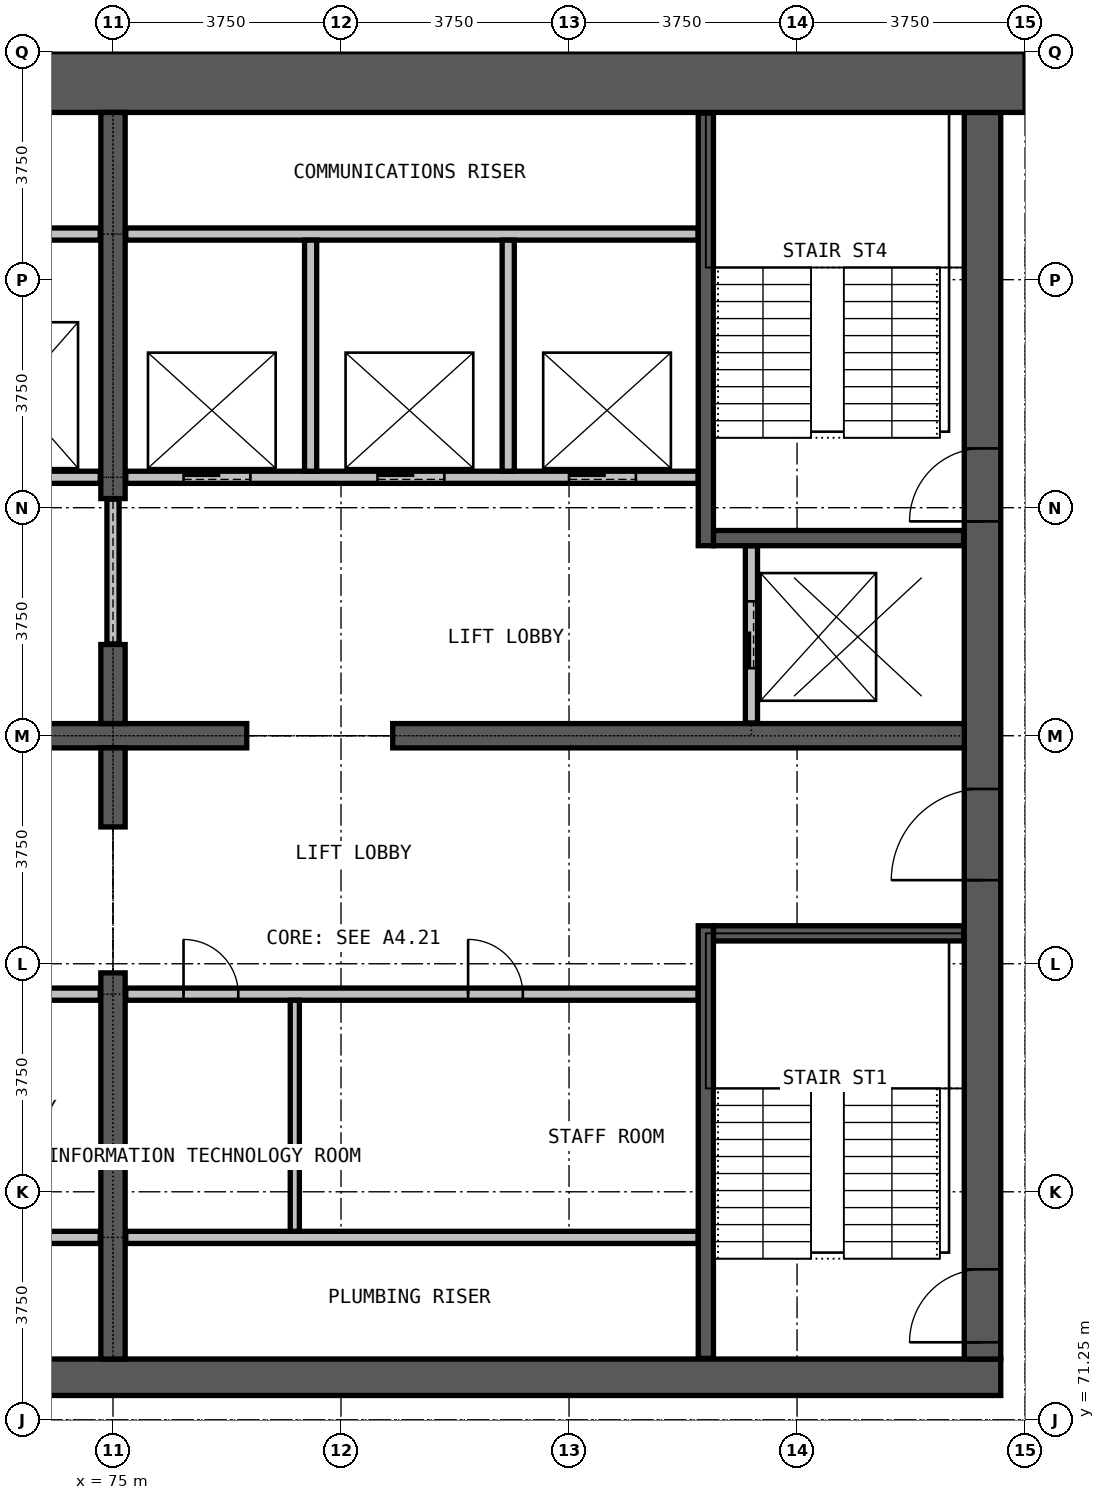
"""IFC4 building model, lengths in metres.
Left out: names, types, materials, properties, quantities, classifications, styles, units other than length and angle.
Written with IfcOpenShell. Run it as: python <this file> out.ifc"""

import sys

from ifc_helpers import new_model, si_unit, direction, frame, frame_2d, origin, place, context, subcontext, project, spatial, rectangle, extrude, element, fill, save


model = new_model("IFC4")
c1 = context("Model", 3, precision=1e-05, world=origin(), true_north=direction((0.0, 1.0)))
c2 = subcontext(c1, "Body", "Model", "MODEL_VIEW")
j1 = project(units=[si_unit("LENGTHUNIT", "METRE"), si_unit("PLANEANGLEUNIT", "RADIAN")], contexts=[c1])
p1 = place(None, origin())
s1 = spatial("IfcSite", under=j1, at=p1, CompositionType="ELEMENT")
p2 = place(p1, origin())
s2 = spatial("IfcBuilding", under=s1, at=p2, CompositionType="ELEMENT")
p3 = place(p2, frame((0.0, 0.0, 188.7)))
s3 = spatial("IfcBuildingStorey", under=s2, at=p3, CompositionType="ELEMENT", Elevation=188.7)
p4 = place(p3, frame((60.4, 71.95, 0.0), z_axis=(0.0, 0.0, 1.0), x_axis=(1.0, 0.0, 0.0)))
e1 = element("IfcWall", 1, at=p4, inside=s3, PredefinedType="SHEAR", context=c2, shape_type="SweptSolid", body=[
    extrude(rectangle(XDim=29.2, YDim=0.6, at=frame_2d((14.6, 0.0))), origin(), (0.0, 0.0, 1.0), 3.6),
])
p5 = place(p3, frame((89.3, 72.25, 0.0), z_axis=(0.0, 0.0, 1.0), x_axis=(0.0, 1.0, 0.0)))
e2 = element("IfcWall", 2, at=p5, inside=s3, PredefinedType="SHEAR", context=c2, shape_type="SweptSolid", body=[
    extrude(rectangle(XDim=20.5, YDim=0.6, at=frame_2d((10.25, 0.0))), origin(), (0.0, 0.0, 1.0), 3.6),
])
p6 = place(p5, frame((0.275, 0.0, 0.0)))
e3 = element("IfcOpeningElement", 3, at=p6, cuts=e2, PredefinedType="OPENING", context=c2, shape_type="SweptSolid", body=[
    extrude(rectangle(XDim=1.2, YDim=2.2, at=frame_2d((0.6, 1.1))), frame((0.0, 0.31, 0.0), z_axis=(0.0, -1.0, 0.0), x_axis=(1.0, 0.0, 0.0)), (0.0, 0.0, 1.0), 0.62),
])
p7 = place(p5, frame((13.775, 0.0, 0.0)))
e4 = element("IfcOpeningElement", 4, at=p7, cuts=e2, PredefinedType="OPENING", context=c2, shape_type="SweptSolid", body=[
    extrude(rectangle(XDim=1.2, YDim=2.2, at=frame_2d((0.6, 1.1))), frame((0.0, 0.31, 0.0), z_axis=(0.0, -1.0, 0.0), x_axis=(1.0, 0.0, 0.0)), (0.0, 0.0, 1.0), 0.62),
])
p8 = place(p5, frame((7.875, 0.0, 0.0)))
e5 = element("IfcOpeningElement", 5, at=p8, cuts=e2, PredefinedType="OPENING", context=c2, shape_type="SweptSolid", body=[
    extrude(rectangle(XDim=1.5, YDim=2.2, at=frame_2d((0.75, 1.1))), frame((0.0, 0.31, 0.0), z_axis=(0.0, -1.0, 0.0), x_axis=(1.0, 0.0, 0.0)), (0.0, 0.0, 1.0), 0.62),
])
p9 = place(p3, frame((90.0, 93.25, 0.0), z_axis=(0.0, 0.0, 1.0), x_axis=(-1.0, 0.0, 0.0)))
e6 = element("IfcWall", 6, at=p9, inside=s3, PredefinedType="SHEAR", context=c2, shape_type="SweptSolid", body=[
    extrude(rectangle(XDim=30.0, YDim=1.0, at=frame_2d((15.0, 0.0))), origin(), (0.0, 0.0, 1.0), 3.6),
])
p10 = place(p3, frame((72.8, 82.5, 0.0), z_axis=(0.0, 0.0, 1.0), x_axis=(1.0, 0.0, 0.0)))
e7 = element("IfcWall", 7, at=p10, inside=s3, PredefinedType="SHEAR", context=c2, shape_type="SweptSolid", body=[
    extrude(rectangle(XDim=4.4, YDim=0.4, at=frame_2d((2.2, 0.0))), origin(), (0.0, 0.0, 1.0), 3.6),
])
p11 = place(p3, frame((79.6, 82.5, 0.0), z_axis=(0.0, 0.0, 1.0), x_axis=(1.0, 0.0, 0.0)))
e8 = element("IfcWall", 8, at=p11, inside=s3, PredefinedType="SHEAR", context=c2, shape_type="SweptSolid", body=[
    extrude(rectangle(XDim=9.4, YDim=0.4, at=frame_2d((4.7, 0.0))), origin(), (0.0, 0.0, 1.0), 3.6),
])
p12 = place(p3, frame((75.0, 72.25, 0.0), z_axis=(0.0, 0.0, 1.0), x_axis=(0.0, 1.0, 0.0)))
e9 = element("IfcWall", 9, at=p12, inside=s3, PredefinedType="SHEAR", context=c2, shape_type="SweptSolid", body=[
    extrude(rectangle(XDim=6.35, YDim=0.4, at=frame_2d((3.175, 0.0))), origin(), (0.0, 0.0, 1.0), 3.6),
])
for number, where, z_axis, x_axis in (
    (10, (75.0, 81.0, 0.0), (0.0, 0.0, 1.0), (0.0, 1.0, 0.0)),
    (11, (75.0, 82.7, 0.0), (0.0, 0.0, 1.0), (0.0, 1.0, 0.0)),
):
    element("IfcWall", number, at=place(p3, frame(where, z_axis=z_axis, x_axis=x_axis)), inside=s3, PredefinedType="SHEAR", context=c2, shape_type="SweptSolid", body=[
        extrude(rectangle(XDim=1.3, YDim=0.4, at=frame_2d((0.65, 0.0))), origin(), (0.0, 0.0, 1.0), 3.6),
    ])
p13 = place(p3, frame((75.0, 86.4, 0.0), z_axis=(0.0, 0.0, 1.0), x_axis=(0.0, 1.0, 0.0)))
e12 = element("IfcWall", 12, at=p13, inside=s3, PredefinedType="SHEAR", context=c2, shape_type="SweptSolid", body=[
    extrude(rectangle(XDim=6.35, YDim=0.4, at=frame_2d((3.175, 0.0))), origin(), (0.0, 0.0, 1.0), 3.6),
])
for number, where, z_axis, x_axis in (
    (13, (65.375, 74.25, 0.0), (0.0, 0.0, 1.0), (1.0, 0.0, 0.0)),
    (14, (75.21, 74.25, 0.0), (0.0, 0.0, 1.0), (1.0, 0.0, 0.0)),
):
    element("IfcWall", number, at=place(p3, frame(where, z_axis=z_axis, x_axis=x_axis)), inside=s3, PredefinedType="PARTITIONING", context=c2, shape_type="SweptSolid", body=[
        extrude(rectangle(XDim=9.415, YDim=0.2, at=frame_2d((4.708, 0.0))), origin(), (0.0, 0.0, 1.0), 3.3),
    ])
p14 = place(p3, frame((65.375, 78.25, 0.0), z_axis=(0.0, 0.0, 1.0), x_axis=(1.0, 0.0, 0.0)))
e15 = element("IfcWall", 15, at=p14, inside=s3, PredefinedType="PARTITIONING", context=c2, shape_type="SweptSolid", body=[
    extrude(rectangle(XDim=9.415, YDim=0.2, at=frame_2d((4.708, 0.0))), origin(), (0.0, 0.0, 1.0), 3.3),
])
p15 = place(p14, frame((1.9, 0.0, 0.0)))
e16 = element("IfcOpeningElement", 16, at=p15, cuts=e15, PredefinedType="OPENING", context=c2, shape_type="SweptSolid", body=[
    extrude(rectangle(XDim=0.9, YDim=2.2, at=frame_2d((0.45, 1.1))), frame((0.0, 0.11, 0.0), z_axis=(0.0, -1.0, 0.0), x_axis=(1.0, 0.0, 0.0)), (0.0, 0.0, 1.0), 0.22),
])
p16 = place(p14, frame((6.65, 0.0, 0.0)))
e17 = element("IfcOpeningElement", 17, at=p16, cuts=e15, PredefinedType="OPENING", context=c2, shape_type="SweptSolid", body=[
    extrude(rectangle(XDim=0.9, YDim=2.2, at=frame_2d((0.45, 1.1))), frame((0.0, 0.11, 0.0), z_axis=(0.0, -1.0, 0.0), x_axis=(1.0, 0.0, 0.0)), (0.0, 0.0, 1.0), 0.22),
])
p17 = place(p3, frame((75.21, 78.25, 0.0), z_axis=(0.0, 0.0, 1.0), x_axis=(1.0, 0.0, 0.0)))
e18 = element("IfcWall", 18, at=p17, inside=s3, PredefinedType="PARTITIONING", context=c2, shape_type="SweptSolid", body=[
    extrude(rectangle(XDim=9.415, YDim=0.2, at=frame_2d((4.708, 0.0))), origin(), (0.0, 0.0, 1.0), 3.3),
])
p18 = place(p17, frame((0.95, 0.0, 0.0)))
e19 = element("IfcOpeningElement", 19, at=p18, cuts=e18, PredefinedType="OPENING", context=c2, shape_type="SweptSolid", body=[
    extrude(rectangle(XDim=0.9, YDim=2.2, at=frame_2d((0.45, 1.1))), frame((0.0, 0.11, 0.0), z_axis=(0.0, -1.0, 0.0), x_axis=(1.0, 0.0, 0.0)), (0.0, 0.0, 1.0), 0.22),
])
p19 = place(p17, frame((5.63, 0.0, 0.0)))
e20 = element("IfcOpeningElement", 20, at=p19, cuts=e18, PredefinedType="OPENING", context=c2, shape_type="SweptSolid", body=[
    extrude(rectangle(XDim=0.9, YDim=2.2, at=frame_2d((0.45, 1.1))), frame((0.0, 0.11, 0.0), z_axis=(0.0, -1.0, 0.0), x_axis=(1.0, 0.0, 0.0)), (0.0, 0.0, 1.0), 0.22),
])
p20 = place(p3, frame((75.0, 84.01, 0.0), z_axis=(0.0, 0.0, 1.0), x_axis=(0.0, 1.0, 0.0)))
e21 = element("IfcWall", 21, at=p20, inside=s3, PredefinedType="PARTITIONING", context=c2, shape_type="SweptSolid", body=[
    extrude(rectangle(XDim=2.38, YDim=0.2, at=frame_2d((1.19, 0.0))), origin(), (0.0, 0.0, 1.0), 2.4),
])
p21 = place(p3, frame((77.99, 74.35, 0.0), z_axis=(0.0, 0.0, 1.0), x_axis=(0.0, 1.0, 0.0)))
e22 = element("IfcWall", 22, at=p21, inside=s3, PredefinedType="PARTITIONING", context=c2, shape_type="SweptSolid", body=[
    extrude(rectangle(XDim=3.8, YDim=0.15, at=frame_2d((1.9, 0.0))), origin(), (0.0, 0.0, 1.0), 3.3),
])
p22 = place(p3, frame((65.375, 86.75, 0.0), z_axis=(0.0, 0.0, 1.0), x_axis=(1.0, 0.0, 0.0)))
e23 = element("IfcWall", 23, at=p22, inside=s3, PredefinedType="PARTITIONING", context=c2, shape_type="SweptSolid", body=[
    extrude(rectangle(XDim=9.415, YDim=0.2, at=frame_2d((4.708, 0.0))), origin(), (0.0, 0.0, 1.0), 3.3),
])
p23 = place(p22, frame((1.0, 0.0, 0.0)))
e24 = element("IfcOpeningElement", 24, at=p23, cuts=e23, PredefinedType="OPENING", context=c2, shape_type="SweptSolid", body=[
    extrude(rectangle(XDim=1.1, YDim=2.2, at=frame_2d((0.55, 1.1))), frame((0.0, 0.11, 0.0), z_axis=(0.0, -1.0, 0.0), x_axis=(1.0, 0.0, 0.0)), (0.0, 0.0, 1.0), 0.22),
])
p24 = place(p22, frame((4.175, 0.0, 0.0)))
e25 = element("IfcOpeningElement", 25, at=p24, cuts=e23, PredefinedType="OPENING", context=c2, shape_type="SweptSolid", body=[
    extrude(rectangle(XDim=1.1, YDim=2.2, at=frame_2d((0.55, 1.1))), frame((0.0, 0.11, 0.0), z_axis=(0.0, -1.0, 0.0), x_axis=(1.0, 0.0, 0.0)), (0.0, 0.0, 1.0), 0.22),
])
p25 = place(p22, frame((7.325, 0.0, 0.0)))
e26 = element("IfcOpeningElement", 26, at=p25, cuts=e23, PredefinedType="OPENING", context=c2, shape_type="SweptSolid", body=[
    extrude(rectangle(XDim=1.1, YDim=2.2, at=frame_2d((0.55, 1.1))), frame((0.0, 0.11, 0.0), z_axis=(0.0, -1.0, 0.0), x_axis=(1.0, 0.0, 0.0)), (0.0, 0.0, 1.0), 0.22),
])
p26 = place(p3, frame((75.21, 86.75, 0.0), z_axis=(0.0, 0.0, 1.0), x_axis=(1.0, 0.0, 0.0)))
e27 = element("IfcWall", 27, at=p26, inside=s3, PredefinedType="PARTITIONING", context=c2, shape_type="SweptSolid", body=[
    extrude(rectangle(XDim=9.415, YDim=0.2, at=frame_2d((4.708, 0.0))), origin(), (0.0, 0.0, 1.0), 3.3),
])
p27 = place(p26, frame((0.95, 0.0, 0.0)))
e28 = element("IfcOpeningElement", 28, at=p27, cuts=e27, PredefinedType="OPENING", context=c2, shape_type="SweptSolid", body=[
    extrude(rectangle(XDim=1.1, YDim=2.2, at=frame_2d((0.55, 1.1))), frame((0.0, 0.11, 0.0), z_axis=(0.0, -1.0, 0.0), x_axis=(1.0, 0.0, 0.0)), (0.0, 0.0, 1.0), 0.22),
])
p28 = place(p26, frame((4.14, 0.0, 0.0)))
e29 = element("IfcOpeningElement", 29, at=p28, cuts=e27, PredefinedType="OPENING", context=c2, shape_type="SweptSolid", body=[
    extrude(rectangle(XDim=1.1, YDim=2.2, at=frame_2d((0.55, 1.1))), frame((0.0, 0.11, 0.0), z_axis=(0.0, -1.0, 0.0), x_axis=(1.0, 0.0, 0.0)), (0.0, 0.0, 1.0), 0.22),
])
p29 = place(p26, frame((7.29, 0.0, 0.0)))
e30 = element("IfcOpeningElement", 30, at=p29, cuts=e27, PredefinedType="OPENING", context=c2, shape_type="SweptSolid", body=[
    extrude(rectangle(XDim=1.1, YDim=2.2, at=frame_2d((0.55, 1.1))), frame((0.0, 0.11, 0.0), z_axis=(0.0, -1.0, 0.0), x_axis=(1.0, 0.0, 0.0)), (0.0, 0.0, 1.0), 0.22),
])
for number, where, z_axis, x_axis in (
    (31, (65.375, 90.75, 0.0), (0.0, 0.0, 1.0), (1.0, 0.0, 0.0)),
    (32, (75.21, 90.75, 0.0), (0.0, 0.0, 1.0), (1.0, 0.0, 0.0)),
):
    element("IfcWall", number, at=place(p3, frame(where, z_axis=z_axis, x_axis=x_axis)), inside=s3, PredefinedType="PARTITIONING", context=c2, shape_type="SweptSolid", body=[
        extrude(rectangle(XDim=9.415, YDim=0.2, at=frame_2d((4.708, 0.0))), origin(), (0.0, 0.0, 1.0), 3.3),
    ])
for number, where, z_axis, x_axis in (
    (33, (78.25, 86.85, 0.0), (0.0, 0.0, 1.0), (0.0, 1.0, 0.0)),
    (34, (81.5, 86.85, 0.0), (0.0, 0.0, 1.0), (0.0, 1.0, 0.0)),
):
    element("IfcWall", number, at=place(p3, frame(where, z_axis=z_axis, x_axis=x_axis)), inside=s3, PredefinedType="PARTITIONING", context=c2, shape_type="SweptSolid", body=[
        extrude(rectangle(XDim=3.8, YDim=0.2, at=frame_2d((1.9, 0.0))), origin(), (0.0, 0.0, 1.0), 3.3),
    ])
p30 = place(p3, frame((85.5, 82.71, 0.0), z_axis=(0.0, 0.0, 1.0), x_axis=(0.0, 1.0, 0.0)))
e35 = element("IfcWall", 35, at=p30, inside=s3, PredefinedType="PARTITIONING", context=c2, shape_type="SweptSolid", body=[
    extrude(rectangle(XDim=2.915, YDim=0.2, at=frame_2d((1.458, 0.0))), origin(), (0.0, 0.0, 1.0), 3.3),
])
p31 = place(p30, frame((0.9, 0.0, 0.0)))
e36 = element("IfcOpeningElement", 36, at=p31, cuts=e35, PredefinedType="OPENING", context=c2, shape_type="SweptSolid", body=[
    extrude(rectangle(XDim=1.1, YDim=2.2, at=frame_2d((0.55, 1.1))), frame((0.0, 0.11, 0.0), z_axis=(0.0, -1.0, 0.0), x_axis=(1.0, 0.0, 0.0)), (0.0, 0.0, 1.0), 0.22),
])
for number, where, z_axis, x_axis in (
    (37, (84.875, 79.25, 0.0), (0.0, 0.0, 1.0), (1.0, 0.0, 0.0)),
    (38, (84.875, 85.75, 0.0), (0.0, 0.0, 1.0), (1.0, 0.0, 0.0)),
):
    element("IfcWall", number, at=place(p3, frame(where, z_axis=z_axis, x_axis=x_axis)), inside=s3, PredefinedType="PARTITIONING", context=c2, shape_type="SweptSolid", body=[
        extrude(rectangle(XDim=4.115, YDim=0.25, at=frame_2d((2.058, 0.0))), origin(), (0.0, 0.0, 1.0), 3.3),
    ])
for number, where, z_axis, x_axis in (
    (39, (84.75, 72.26, 0.0), (0.0, 0.0, 1.0), (0.0, 1.0, 0.0)),
    (40, (84.75, 85.625, 0.0), (0.0, 0.0, 1.0), (0.0, 1.0, 0.0)),
):
    element("IfcWall", number, at=place(p3, frame(where, z_axis=z_axis, x_axis=x_axis)), inside=s3, PredefinedType="PARTITIONING", context=c2, shape_type="SweptSolid", body=[
        extrude(rectangle(XDim=7.115, YDim=0.25, at=frame_2d((3.558, 0.0))), origin(), (0.0, 0.0, 1.0), 3.3),
    ])
p32 = place(p27, origin())
e41 = element("IfcDoor", 41, at=p32, inside=s3, OperationType="DOUBLE_DOOR_SLIDING", PredefinedType="DOOR", context=c2, shape_type="SweptSolid", body=[
    extrude(rectangle(XDim=1.1, YDim=2.2, at=frame_2d((0.55, 1.1))), frame((0.0, 0.025, 0.0), z_axis=(0.0, -1.0, 0.0), x_axis=(1.0, 0.0, 0.0)), (0.0, 0.0, 1.0), 0.05),
])
fill(e28, e41)
p33 = place(p28, origin())
e42 = element("IfcDoor", 42, at=p33, inside=s3, OperationType="DOUBLE_DOOR_SLIDING", PredefinedType="DOOR", context=c2, shape_type="SweptSolid", body=[
    extrude(rectangle(XDim=1.1, YDim=2.2, at=frame_2d((0.55, 1.1))), frame((0.0, 0.025, 0.0), z_axis=(0.0, -1.0, 0.0), x_axis=(1.0, 0.0, 0.0)), (0.0, 0.0, 1.0), 0.05),
])
fill(e29, e42)
p34 = place(p29, origin())
e43 = element("IfcDoor", 43, at=p34, inside=s3, OperationType="DOUBLE_DOOR_SLIDING", PredefinedType="DOOR", context=c2, shape_type="SweptSolid", body=[
    extrude(rectangle(XDim=1.1, YDim=2.2, at=frame_2d((0.55, 1.1))), frame((0.0, 0.025, 0.0), z_axis=(0.0, -1.0, 0.0), x_axis=(1.0, 0.0, 0.0)), (0.0, 0.0, 1.0), 0.05),
])
fill(e30, e43)
p35 = place(p31, origin())
e44 = element("IfcDoor", 44, at=p35, inside=s3, OperationType="DOUBLE_DOOR_SLIDING", PredefinedType="DOOR", context=c2, shape_type="SweptSolid", body=[
    extrude(rectangle(XDim=1.1, YDim=2.2, at=frame_2d((0.55, 1.1))), frame((0.0, 0.025, 0.0), z_axis=(0.0, -1.0, 0.0), x_axis=(1.0, 0.0, 0.0)), (0.0, 0.0, 1.0), 0.05),
])
fill(e36, e44)
p36 = place(p6, origin())
e45 = element("IfcDoor", 45, at=p36, inside=s3, OperationType="SINGLE_SWING_RIGHT", PredefinedType="DOOR", context=c2, shape_type="SweptSolid", body=[
    extrude(rectangle(XDim=1.2, YDim=2.2, at=frame_2d((0.6, 1.1))), frame((0.0, 0.025, 0.0), z_axis=(0.0, -1.0, 0.0), x_axis=(1.0, 0.0, 0.0)), (0.0, 0.0, 1.0), 0.05),
])
fill(e3, e45)
p37 = place(p7, origin())
e46 = element("IfcDoor", 46, at=p37, inside=s3, OperationType="SINGLE_SWING_LEFT", PredefinedType="DOOR", context=c2, shape_type="SweptSolid", body=[
    extrude(rectangle(XDim=1.2, YDim=2.2, at=frame_2d((0.6, 1.1))), frame((0.0, 0.025, 0.0), z_axis=(0.0, -1.0, 0.0), x_axis=(1.0, 0.0, 0.0)), (0.0, 0.0, 1.0), 0.05),
])
fill(e4, e46)
p38 = place(p8, origin())
e47 = element("IfcDoor", 47, at=p38, inside=s3, OperationType="DOUBLE_DOOR_SINGLE_SWING", PredefinedType="DOOR", context=c2, shape_type="SweptSolid", body=[
    extrude(rectangle(XDim=1.5, YDim=2.2, at=frame_2d((0.75, 1.1))), frame((0.0, 0.025, 0.0), z_axis=(0.0, -1.0, 0.0), x_axis=(1.0, 0.0, 0.0)), (0.0, 0.0, 1.0), 0.05),
])
fill(e5, e47)
p39 = place(p18, origin())
e48 = element("IfcDoor", 48, at=p39, inside=s3, OperationType="SINGLE_SWING_LEFT", PredefinedType="DOOR", context=c2, shape_type="SweptSolid", body=[
    extrude(rectangle(XDim=0.9, YDim=2.2, at=frame_2d((0.45, 1.1))), frame((0.0, 0.025, 0.0), z_axis=(0.0, -1.0, 0.0), x_axis=(1.0, 0.0, 0.0)), (0.0, 0.0, 1.0), 0.05),
])
fill(e19, e48)
p40 = place(p19, origin())
e49 = element("IfcDoor", 49, at=p40, inside=s3, OperationType="SINGLE_SWING_LEFT", PredefinedType="DOOR", context=c2, shape_type="SweptSolid", body=[
    extrude(rectangle(XDim=0.9, YDim=2.2, at=frame_2d((0.45, 1.1))), frame((0.0, 0.025, 0.0), z_axis=(0.0, -1.0, 0.0), x_axis=(1.0, 0.0, 0.0)), (0.0, 0.0, 1.0), 0.05),
])
fill(e20, e49)
save(model, sys.argv[1])
